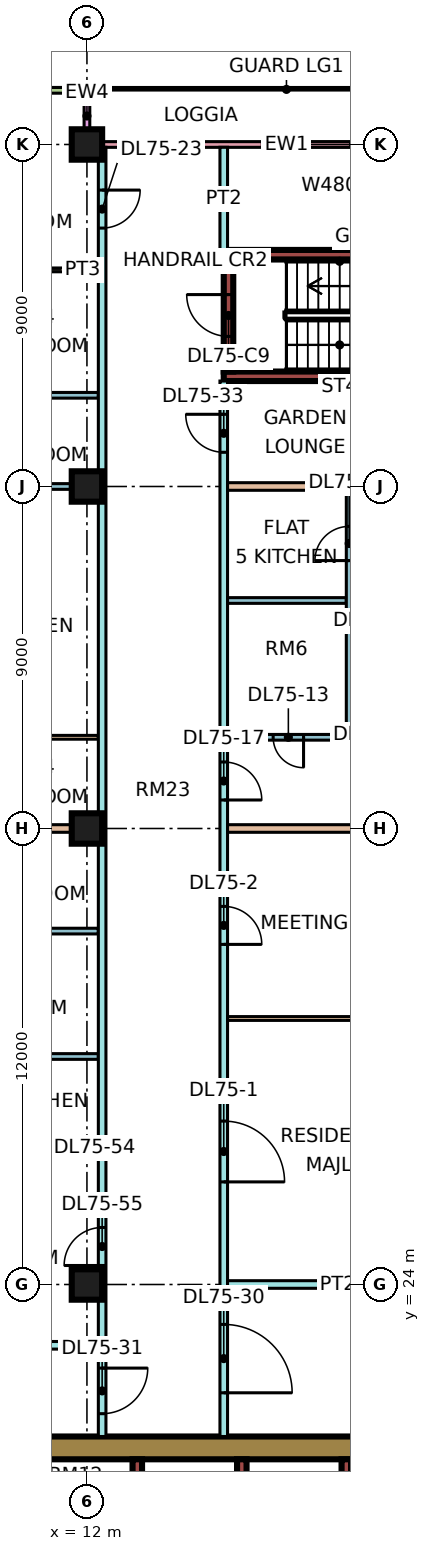
"""IFC4 building model, lengths in metres.
Left out: names, types, materials, properties, quantities, classifications, styles, units other than length and angle.
Written with IfcOpenShell. Run it as: python <this file> out.ifc"""

import sys

from ifc_helpers import new_model, si_unit, direction, frame, frame_2d, origin, origin_2d, place, context, subcontext, project, spatial, rectangle, extrude, element, fill, save


model = new_model("IFC4")
c1 = context("Model", 3, precision=1e-05, world=origin(), true_north=direction((0.0, 1.0)))
c2 = subcontext(c1, "Body", "Model", "MODEL_VIEW")
j1 = project(units=[si_unit("LENGTHUNIT", "METRE"), si_unit("PLANEANGLEUNIT", "RADIAN")], contexts=[c1])
p1 = place(None, origin())
s1 = spatial("IfcSite", under=j1, at=p1, CompositionType="ELEMENT")
p2 = place(p1, origin())
s2 = spatial("IfcBuilding", under=s1, at=p2, CompositionType="ELEMENT")
p3 = place(p2, frame((0.0, 0.0, 318.4)))
s3 = spatial("IfcBuildingStorey", under=s2, at=p3, CompositionType="ELEMENT", Elevation=318.4)
for number, where, z_axis, x_axis in (
    (1, (12.0, 24.0, 0.0), (0.0, 0.0, 1.0), (1.0, 0.0, 0.0)),
    (2, (12.0, 36.0, 0.0), (0.0, 0.0, 1.0), (1.0, 0.0, 0.0)),
    (3, (12.0, 45.0, 0.0), (0.0, 0.0, 1.0), (1.0, 0.0, 0.0)),
    (4, (12.0, 54.0, 0.0), (0.0, 0.0, 1.0), (1.0, 0.0, 0.0)),
):
    element("IfcColumn", number, at=place(p3, frame(where, z_axis=z_axis, x_axis=x_axis)), inside=s3, PredefinedType="COLUMN", context=c2, shape_type="SweptSolid", body=[
        extrude(rectangle(XDim=0.8, YDim=0.8, at=origin_2d()), origin(), (0.0, 0.0, 1.0), 3.75),
    ])
p4 = place(p3, frame((9.0, 19.7, 0.0), z_axis=(0.0, 0.0, 1.0), x_axis=(1.0, 0.0, 0.0)))
e5 = element("IfcWall", 5, at=p4, inside=s3, PredefinedType="SHEAR", context=c2, shape_type="SweptSolid", body=[
    extrude(rectangle(XDim=25.0, YDim=0.6, at=frame_2d((12.5, 0.0))), origin(), (0.0, 0.0, 1.0), 3.75),
])
p5 = place(p4, frame((19.1, 0.0, 0.0)))
e6 = element("IfcOpeningElement", 6, at=p5, cuts=e5, PredefinedType="OPENING", context=c2, shape_type="SweptSolid", body=[
    extrude(rectangle(XDim=1.8, YDim=2.4, at=frame_2d((0.9, 1.2))), frame((0.0, 0.31, 0.0), z_axis=(0.0, -1.0, 0.0), x_axis=(1.0, 0.0, 0.0)), (0.0, 0.0, 1.0), 0.62),
])
p6 = place(p3, frame((13.325, 7.6, 0.0), z_axis=(0.0, 0.0, 1.0), x_axis=(0.0, 1.0, 0.0)))
e7 = element("IfcWall", 7, at=p6, inside=s3, PredefinedType="SHEAR", context=c2, shape_type="SweptSolid", body=[
    extrude(rectangle(XDim=11.8, YDim=0.25, at=frame_2d((5.9, 0.0))), origin(), (0.0, 0.0, 1.0), 3.75),
])
for number, where, z_axis, x_axis in (
    (8, (16.075, 15.8, 0.0), (0.0, 0.0, 1.0), (0.0, 1.0, 0.0)),
    (9, (18.825, 15.8, 0.0), (0.0, 0.0, 1.0), (0.0, 1.0, 0.0)),
):
    element("IfcWall", number, at=place(p3, frame(where, z_axis=z_axis, x_axis=x_axis)), inside=s3, PredefinedType="SHEAR", context=c2, shape_type="SweptSolid", body=[
        extrude(rectangle(XDim=3.6, YDim=0.25, at=frame_2d((1.8, 0.0))), origin(), (0.0, 0.0, 1.0), 3.75),
    ])
for number, where, z_axis, x_axis in (
    (10, (15.6, 47.9, 0.0), (0.0, 0.0, 1.0), (1.0, 0.0, 0.0)),
    (11, (15.6, 51.1, 0.0), (0.0, 0.0, 1.0), (1.0, 0.0, 0.0)),
):
    element("IfcWall", number, at=place(p3, frame(where, z_axis=z_axis, x_axis=x_axis)), inside=s3, PredefinedType="SHEAR", context=c2, shape_type="SweptSolid", body=[
        extrude(rectangle(XDim=7.0, YDim=0.25, at=frame_2d((3.5, 0.0))), origin(), (0.0, 0.0, 1.0), 3.75),
    ])
p7 = place(p3, frame((15.725, 48.025, 0.0), z_axis=(0.0, 0.0, 1.0), x_axis=(0.0, 1.0, 0.0)))
e12 = element("IfcWall", 12, at=p7, inside=s3, PredefinedType="SHEAR", context=c2, shape_type="SweptSolid", body=[
    extrude(rectangle(XDim=2.95, YDim=0.25, at=frame_2d((1.475, 0.0))), origin(), (0.0, 0.0, 1.0), 3.75),
])
p8 = place(p7, frame((0.925, 0.0, 0.0)))
e13 = element("IfcOpeningElement", 13, at=p8, cuts=e12, PredefinedType="OPENING", context=c2, shape_type="SweptSolid", body=[
    extrude(rectangle(XDim=1.1, YDim=2.2, at=frame_2d((0.55, 1.1))), frame((0.0, 0.135, 0.0), z_axis=(0.0, -1.0, 0.0), x_axis=(1.0, 0.0, 0.0)), (0.0, 0.0, 1.0), 0.27),
])
p9 = place(p3, frame((22.425, 54.0, 0.0), z_axis=(0.0, 0.0, 1.0), x_axis=(-1.0, 0.0, 0.0)))
e14 = element("IfcWall", 14, at=p9, inside=s3, PredefinedType="SOLIDWALL", context=c2, shape_type="SweptSolid", body=[
    extrude(rectangle(XDim=10.35, YDim=0.15, at=frame_2d((5.175, 0.0))), origin(), (0.0, 0.0, 1.0), 3.3),
])
p10 = place(p9, frame((1.012, 0.0, 0.45)))
e15 = element("IfcOpeningElement", 15, at=p10, cuts=e14, PredefinedType="OPENING", context=c2, shape_type="SweptSolid", body=[
    extrude(rectangle(XDim=4.8, YDim=2.4, at=frame_2d((2.4, 1.2))), frame((0.0, 0.085, 0.0), z_axis=(0.0, -1.0, 0.0), x_axis=(1.0, 0.0, 0.0)), (0.0, 0.0, 1.0), 0.17),
])
p11 = place(p3, frame((12.0, 55.5, 0.0), z_axis=(0.0, 0.0, 1.0), x_axis=(0.0, -1.0, 0.0)))
e16 = element("IfcWall", 16, at=p11, inside=s3, PredefinedType="SOLIDWALL", context=c2, shape_type="SweptSolid", body=[
    extrude(rectangle(XDim=1.5, YDim=0.15, at=frame_2d((0.75, 0.0))), origin(), (0.0, 0.0, 1.0), 3.3),
])
p12 = place(p3, frame((11.925, 55.425, 0.0), z_axis=(0.0, 0.0, 1.0), x_axis=(-1.0, 0.0, 0.0)))
e17 = element("IfcWall", 17, at=p12, inside=s3, PredefinedType="SOLIDWALL", context=c2, shape_type="SweptSolid", body=[
    extrude(rectangle(XDim=10.425, YDim=0.15, at=frame_2d((5.212, 0.0))), origin(), (0.0, 0.0, 1.0), 3.3),
])
p13 = place(p12, frame((0.962, 0.0, 0.45)))
e18 = element("IfcOpeningElement", 18, at=p13, cuts=e17, PredefinedType="OPENING", context=c2, shape_type="SweptSolid", body=[
    extrude(rectangle(XDim=3.0, YDim=2.4, at=frame_2d((1.5, 1.2))), frame((0.0, 0.085, 0.0), z_axis=(0.0, -1.0, 0.0), x_axis=(1.0, 0.0, 0.0)), (0.0, 0.0, 1.0), 0.17),
])
p14 = place(p12, frame((6.175, 0.0, 0.45)))
e19 = element("IfcOpeningElement", 19, at=p14, cuts=e17, PredefinedType="OPENING", context=c2, shape_type="SweptSolid", body=[
    extrude(rectangle(XDim=3.0, YDim=2.4, at=frame_2d((1.5, 1.2))), frame((0.0, 0.085, 0.0), z_axis=(0.0, -1.0, 0.0), x_axis=(1.0, 0.0, 0.0)), (0.0, 0.0, 1.0), 0.17),
])
p15 = place(p3, frame((0.0, 36.0, 0.0), z_axis=(0.0, 0.0, 1.0), x_axis=(1.0, 0.0, 0.0)))
e20 = element("IfcWall", 20, at=p15, inside=s3, PredefinedType="PARTITIONING", context=c2, shape_type="SweptSolid", body=[
    extrude(rectangle(XDim=12.3, YDim=0.2, at=frame_2d((6.15, 0.0))), origin(), (0.0, 0.0, 1.0), 3.3),
])
p16 = place(p3, frame((0.074, 22.4, 0.0), z_axis=(0.0, 0.0, 1.0), x_axis=(1.0, 0.0, 0.0)))
e21 = element("IfcWall", 21, at=p16, inside=s3, PredefinedType="PARTITIONING", context=c2, shape_type="SweptSolid", body=[
    extrude(rectangle(XDim=12.226, YDim=0.2, at=frame_2d((6.113, 0.0))), origin(), (0.0, 0.0, 1.0), 3.3),
])
p17 = place(p3, frame((7.675, 27.6, 0.0), z_axis=(0.0, 0.0, 1.0), x_axis=(1.0, 0.0, 0.0)))
e22 = element("IfcWall", 22, at=p17, inside=s3, PredefinedType="PARTITIONING", context=c2, shape_type="SweptSolid", body=[
    extrude(rectangle(XDim=4.625, YDim=0.1, at=frame_2d((2.312, 0.0))), origin(), (0.0, 0.0, 1.0), 3.3),
])
p18 = place(p17, frame((1.875, 0.0, 0.0)))
e23 = element("IfcOpeningElement", 23, at=p18, cuts=e22, PredefinedType="OPENING", context=c2, shape_type="SweptSolid", body=[
    extrude(rectangle(XDim=0.9, YDim=2.1, at=frame_2d((0.45, 1.05))), frame((0.0, 0.06, 0.0), z_axis=(0.0, -1.0, 0.0), x_axis=(1.0, 0.0, 0.0)), (0.0, 0.0, 1.0), 0.12),
])
for number, where, z_axis, x_axis in (
    (24, (7.675, 30.0, 0.0), (0.0, 0.0, 1.0), (1.0, 0.0, 0.0)),
    (25, (7.675, 33.3, 0.0), (0.0, 0.0, 1.0), (1.0, 0.0, 0.0)),
):
    element("IfcWall", number, at=place(p3, frame(where, z_axis=z_axis, x_axis=x_axis)), inside=s3, PredefinedType="PARTITIONING", context=c2, shape_type="SweptSolid", body=[
        extrude(rectangle(XDim=4.625, YDim=0.15, at=frame_2d((2.312, 0.0))), origin(), (0.0, 0.0, 1.0), 3.3),
    ])
p19 = place(p3, frame((8.275, 38.4, 0.0), z_axis=(0.0, 0.0, 1.0), x_axis=(1.0, 0.0, 0.0)))
e26 = element("IfcWall", 26, at=p19, inside=s3, PredefinedType="PARTITIONING", context=c2, shape_type="SweptSolid", body=[
    extrude(rectangle(XDim=4.025, YDim=0.1, at=frame_2d((2.013, 0.0))), origin(), (0.0, 0.0, 1.0), 3.3),
])
for number, where, z_axis, x_axis in (
    (27, (8.275, 45.0, 0.0), (0.0, 0.0, 1.0), (1.0, 0.0, 0.0)),
    (28, (8.275, 47.4, 0.0), (0.0, 0.0, 1.0), (1.0, 0.0, 0.0)),
):
    element("IfcWall", number, at=place(p3, frame(where, z_axis=z_axis, x_axis=x_axis)), inside=s3, PredefinedType="PARTITIONING", context=c2, shape_type="SweptSolid", body=[
        extrude(rectangle(XDim=4.025, YDim=0.15, at=frame_2d((2.013, 0.0))), origin(), (0.0, 0.0, 1.0), 3.3),
    ])
p20 = place(p3, frame((8.275, 50.7, 0.0), z_axis=(0.0, 0.0, 1.0), x_axis=(1.0, 0.0, 0.0)))
e29 = element("IfcWall", 29, at=p20, inside=s3, PredefinedType="PARTITIONING", context=c2, shape_type="SweptSolid", body=[
    extrude(rectangle(XDim=4.025, YDim=0.1, at=frame_2d((2.013, 0.0))), origin(), (0.0, 0.0, 1.0), 3.3),
])
p21 = place(p20, frame((1.575, 0.0, 0.0)))
e30 = element("IfcOpeningElement", 30, at=p21, cuts=e29, PredefinedType="OPENING", context=c2, shape_type="SweptSolid", body=[
    extrude(rectangle(XDim=0.9, YDim=2.1, at=frame_2d((0.45, 1.05))), frame((0.0, 0.06, 0.0), z_axis=(0.0, -1.0, 0.0), x_axis=(1.0, 0.0, 0.0)), (0.0, 0.0, 1.0), 0.12),
])
p22 = place(p3, frame((12.4, 20.0, 0.0), z_axis=(0.0, 0.0, 1.0), x_axis=(0.0, 1.0, 0.0)))
e31 = element("IfcWall", 31, at=p22, inside=s3, PredefinedType="PARTITIONING", context=c2, shape_type="SweptSolid", body=[
    extrude(rectangle(XDim=33.926, YDim=0.2, at=frame_2d((16.963, 0.0))), origin(), (0.0, 0.0, 1.0), 3.3),
])
p23 = place(p22, frame((31.8, 0.0, 0.0)))
e32 = element("IfcOpeningElement", 32, at=p23, cuts=e31, PredefinedType="OPENING", context=c2, shape_type="SweptSolid", body=[
    extrude(rectangle(XDim=1.0, YDim=2.1, at=frame_2d((0.5, 1.05))), frame((0.0, 0.11, 0.0), z_axis=(0.0, -1.0, 0.0), x_axis=(1.0, 0.0, 0.0)), (0.0, 0.0, 1.0), 0.22),
])
p24 = place(p22, frame((0.6, 0.0, 0.0)))
e33 = element("IfcOpeningElement", 33, at=p24, cuts=e31, PredefinedType="OPENING", context=c2, shape_type="SweptSolid", body=[
    extrude(rectangle(XDim=1.2, YDim=2.1, at=frame_2d((0.6, 1.05))), frame((0.0, 0.11, 0.0), z_axis=(0.0, -1.0, 0.0), x_axis=(1.0, 0.0, 0.0)), (0.0, 0.0, 1.0), 0.22),
])
p25 = place(p22, frame((4.5, 0.0, 0.0)))
e34 = element("IfcOpeningElement", 34, at=p25, cuts=e31, PredefinedType="OPENING", context=c2, shape_type="SweptSolid", body=[
    extrude(rectangle(XDim=1.0, YDim=2.1, at=frame_2d((0.5, 1.05))), frame((0.0, 0.11, 0.0), z_axis=(0.0, -1.0, 0.0), x_axis=(1.0, 0.0, 0.0)), (0.0, 0.0, 1.0), 0.22),
])
p26 = place(p3, frame((15.6, 20.0, 0.0), z_axis=(0.0, 0.0, 1.0), x_axis=(0.0, 1.0, 0.0)))
e35 = element("IfcWall", 35, at=p26, inside=s3, PredefinedType="PARTITIONING", context=c2, shape_type="SweptSolid", body=[
    extrude(rectangle(XDim=27.775, YDim=0.2, at=frame_2d((13.887, 0.0))), origin(), (0.0, 0.0, 1.0), 3.3),
])
p27 = place(p26, frame((6.7, 0.0, 0.0)))
e36 = element("IfcOpeningElement", 36, at=p27, cuts=e35, PredefinedType="OPENING", context=c2, shape_type="SweptSolid", body=[
    extrude(rectangle(XDim=1.6, YDim=2.1, at=frame_2d((0.8, 1.05))), frame((0.0, 0.11, 0.0), z_axis=(0.0, -1.0, 0.0), x_axis=(1.0, 0.0, 0.0)), (0.0, 0.0, 1.0), 0.22),
])
p28 = place(p26, frame((12.95, 0.0, 0.0)))
e37 = element("IfcOpeningElement", 37, at=p28, cuts=e35, PredefinedType="OPENING", context=c2, shape_type="SweptSolid", body=[
    extrude(rectangle(XDim=1.0, YDim=2.1, at=frame_2d((0.5, 1.05))), frame((0.0, 0.11, 0.0), z_axis=(0.0, -1.0, 0.0), x_axis=(1.0, 0.0, 0.0)), (0.0, 0.0, 1.0), 0.22),
])
p29 = place(p26, frame((16.75, 0.0, 0.0)))
e38 = element("IfcOpeningElement", 38, at=p29, cuts=e35, PredefinedType="OPENING", context=c2, shape_type="SweptSolid", body=[
    extrude(rectangle(XDim=1.0, YDim=2.1, at=frame_2d((0.5, 1.05))), frame((0.0, 0.11, 0.0), z_axis=(0.0, -1.0, 0.0), x_axis=(1.0, 0.0, 0.0)), (0.0, 0.0, 1.0), 0.22),
])
p30 = place(p26, frame((1.15, 0.0, 0.0)))
e39 = element("IfcOpeningElement", 39, at=p30, cuts=e35, PredefinedType="OPENING", context=c2, shape_type="SweptSolid", body=[
    extrude(rectangle(XDim=1.8, YDim=2.1, at=frame_2d((0.9, 1.05))), frame((0.0, 0.11, 0.0), z_axis=(0.0, -1.0, 0.0), x_axis=(1.0, 0.0, 0.0)), (0.0, 0.0, 1.0), 0.22),
])
p31 = place(p26, frame((25.9, 0.0, 0.0)))
e40 = element("IfcOpeningElement", 40, at=p31, cuts=e35, PredefinedType="OPENING", context=c2, shape_type="SweptSolid", body=[
    extrude(rectangle(XDim=1.0, YDim=2.1, at=frame_2d((0.5, 1.05))), frame((0.0, 0.11, 0.0), z_axis=(0.0, -1.0, 0.0), x_axis=(1.0, 0.0, 0.0)), (0.0, 0.0, 1.0), 0.22),
])
p32 = place(p3, frame((15.6, 51.225, 0.0), z_axis=(0.0, 0.0, 1.0), x_axis=(0.0, 1.0, 0.0)))
e41 = element("IfcWall", 41, at=p32, inside=s3, PredefinedType="PARTITIONING", context=c2, shape_type="SweptSolid", body=[
    extrude(rectangle(XDim=2.701, YDim=0.2, at=frame_2d((1.351, 0.0))), origin(), (0.0, 0.0, 1.0), 3.3),
])
p33 = place(p3, frame((15.7, 24.0, 0.0), z_axis=(0.0, 0.0, 1.0), x_axis=(1.0, 0.0, 0.0)))
e42 = element("IfcWall", 42, at=p33, inside=s3, PredefinedType="PARTITIONING", context=c2, shape_type="SweptSolid", body=[
    extrude(rectangle(XDim=5.8, YDim=0.2, at=frame_2d((2.9, 0.0))), origin(), (0.0, 0.0, 1.0), 3.3),
])
p34 = place(p3, frame((15.7, 31.0, 0.0), z_axis=(0.0, 0.0, 1.0), x_axis=(1.0, 0.0, 0.0)))
e43 = element("IfcWall", 43, at=p34, inside=s3, PredefinedType="PARTITIONING", context=c2, shape_type="SweptSolid", body=[
    extrude(rectangle(XDim=5.8, YDim=0.1, at=frame_2d((2.9, 0.0))), origin(), (0.0, 0.0, 1.0), 3.3),
])
p35 = place(p3, frame((15.7, 36.0, 0.0), z_axis=(0.0, 0.0, 1.0), x_axis=(1.0, 0.0, 0.0)))
e44 = element("IfcWall", 44, at=p35, inside=s3, PredefinedType="PARTITIONING", context=c2, shape_type="SweptSolid", body=[
    extrude(rectangle(XDim=8.3, YDim=0.2, at=frame_2d((4.15, 0.0))), origin(), (0.0, 0.0, 1.0), 3.3),
])
p36 = place(p3, frame((15.7, 38.4, 0.0), z_axis=(0.0, 0.0, 1.0), x_axis=(1.0, 0.0, 0.0)))
e45 = element("IfcWall", 45, at=p36, inside=s3, PredefinedType="PARTITIONING", context=c2, shape_type="SweptSolid", body=[
    extrude(rectangle(XDim=3.125, YDim=0.15, at=frame_2d((1.562, 0.0))), origin(), (0.0, 0.0, 1.0), 3.3),
])
p37 = place(p36, frame((1.2, 0.0, 0.0)))
e46 = element("IfcOpeningElement", 46, at=p37, cuts=e45, PredefinedType="OPENING", context=c2, shape_type="SweptSolid", body=[
    extrude(rectangle(XDim=0.8, YDim=2.1, at=frame_2d((0.4, 1.05))), frame((0.0, 0.085, 0.0), z_axis=(0.0, -1.0, 0.0), x_axis=(1.0, 0.0, 0.0)), (0.0, 0.0, 1.0), 0.17),
])
p38 = place(p3, frame((15.7, 42.0, 0.0), z_axis=(0.0, 0.0, 1.0), x_axis=(1.0, 0.0, 0.0)))
e47 = element("IfcWall", 47, at=p38, inside=s3, PredefinedType="PARTITIONING", context=c2, shape_type="SweptSolid", body=[
    extrude(rectangle(XDim=3.125, YDim=0.15, at=frame_2d((1.562, 0.0))), origin(), (0.0, 0.0, 1.0), 3.3),
])
p39 = place(p3, frame((15.7, 45.0, 0.0), z_axis=(0.0, 0.0, 1.0), x_axis=(1.0, 0.0, 0.0)))
e48 = element("IfcWall", 48, at=p39, inside=s3, PredefinedType="PARTITIONING", context=c2, shape_type="SweptSolid", body=[
    extrude(rectangle(XDim=8.226, YDim=0.2, at=frame_2d((4.113, 0.0))), origin(), (0.0, 0.0, 1.0), 3.3),
])
p40 = place(p3, frame((18.9, 38.325, 0.0), z_axis=(0.0, 0.0, 1.0), x_axis=(0.0, 1.0, 0.0)))
e49 = element("IfcWall", 49, at=p40, inside=s3, PredefinedType="PARTITIONING", context=c2, shape_type="SweptSolid", body=[
    extrude(rectangle(XDim=6.575, YDim=0.15, at=frame_2d((3.288, 0.0))), origin(), (0.0, 0.0, 1.0), 3.3),
])
p41 = place(p40, frame((4.725, 0.0, 0.0)))
e50 = element("IfcOpeningElement", 50, at=p41, cuts=e49, PredefinedType="OPENING", context=c2, shape_type="SweptSolid", body=[
    extrude(rectangle(XDim=0.9, YDim=2.1, at=frame_2d((0.45, 1.05))), frame((0.0, 0.085, 0.0), z_axis=(0.0, -1.0, 0.0), x_axis=(1.0, 0.0, 0.0)), (0.0, 0.0, 1.0), 0.17),
])
p42 = place(p10, origin())
e51 = element("IfcWindow", 51, at=p42, inside=s3, PartitioningType="SINGLE_PANEL", PredefinedType="WINDOW", context=c2, shape_type="SweptSolid", body=[
    extrude(rectangle(XDim=4.8, YDim=2.4, at=frame_2d((2.4, 1.2))), frame((0.0, 0.03, 0.0), z_axis=(0.0, -1.0, 0.0), x_axis=(1.0, 0.0, 0.0)), (0.0, 0.0, 1.0), 0.06),
])
fill(e15, e51)
p43 = place(p8, frame((1.1, 0.0, 0.0), z_axis=(0.0, 0.0, 1.0), x_axis=(-1.0, 0.0, 0.0)))
e52 = element("IfcDoor", 52, at=p43, inside=s3, OperationType="SINGLE_SWING_RIGHT", PredefinedType="DOOR", context=c2, shape_type="SweptSolid", body=[
    extrude(rectangle(XDim=1.1, YDim=2.2, at=frame_2d((0.55, 1.1))), frame((0.0, 0.025, 0.0), z_axis=(0.0, -1.0, 0.0), x_axis=(1.0, 0.0, 0.0)), (0.0, 0.0, 1.0), 0.05),
])
fill(e13, e52)
p44 = place(p27, frame((1.6, 0.0, 0.0), z_axis=(0.0, 0.0, 1.0), x_axis=(-1.0, 0.0, 0.0)))
e53 = element("IfcDoor", 53, at=p44, inside=s3, OperationType="DOUBLE_DOOR_SINGLE_SWING", PredefinedType="DOOR", context=c2, shape_type="SweptSolid", body=[
    extrude(rectangle(XDim=1.6, YDim=2.1, at=frame_2d((0.8, 1.05))), frame((0.0, 0.025, 0.0), z_axis=(0.0, -1.0, 0.0), x_axis=(1.0, 0.0, 0.0)), (0.0, 0.0, 1.0), 0.05),
])
fill(e36, e53)
p45 = place(p28, frame((1.0, 0.0, 0.0), z_axis=(0.0, 0.0, 1.0), x_axis=(-1.0, 0.0, 0.0)))
e54 = element("IfcDoor", 54, at=p45, inside=s3, OperationType="SINGLE_SWING_LEFT", PredefinedType="DOOR", context=c2, shape_type="SweptSolid", body=[
    extrude(rectangle(XDim=1.0, YDim=2.1, at=frame_2d((0.5, 1.05))), frame((0.0, 0.025, 0.0), z_axis=(0.0, -1.0, 0.0), x_axis=(1.0, 0.0, 0.0)), (0.0, 0.0, 1.0), 0.05),
])
fill(e37, e54)
p46 = place(p37, origin())
e55 = element("IfcDoor", 55, at=p46, inside=s3, OperationType="SINGLE_SWING_RIGHT", PredefinedType="DOOR", context=c2, shape_type="SweptSolid", body=[
    extrude(rectangle(XDim=0.8, YDim=2.1, at=frame_2d((0.4, 1.05))), frame((0.0, 0.025, 0.0), z_axis=(0.0, -1.0, 0.0), x_axis=(1.0, 0.0, 0.0)), (0.0, 0.0, 1.0), 0.05),
])
fill(e46, e55)
p47 = place(p41, origin())
e56 = element("IfcDoor", 56, at=p47, inside=s3, OperationType="SINGLE_SWING_LEFT", PredefinedType="DOOR", context=c2, shape_type="SweptSolid", body=[
    extrude(rectangle(XDim=0.9, YDim=2.1, at=frame_2d((0.45, 1.05))), frame((0.0, 0.025, 0.0), z_axis=(0.0, -1.0, 0.0), x_axis=(1.0, 0.0, 0.0)), (0.0, 0.0, 1.0), 0.05),
])
fill(e50, e56)
p48 = place(p29, frame((1.0, 0.0, 0.0), z_axis=(0.0, 0.0, 1.0), x_axis=(-1.0, 0.0, 0.0)))
e57 = element("IfcDoor", 57, at=p48, inside=s3, OperationType="SINGLE_SWING_LEFT", PredefinedType="DOOR", context=c2, shape_type="SweptSolid", body=[
    extrude(rectangle(XDim=1.0, YDim=2.1, at=frame_2d((0.5, 1.05))), frame((0.0, 0.025, 0.0), z_axis=(0.0, -1.0, 0.0), x_axis=(1.0, 0.0, 0.0)), (0.0, 0.0, 1.0), 0.05),
])
fill(e38, e57)
p49 = place(p23, origin())
e58 = element("IfcDoor", 58, at=p49, inside=s3, OperationType="SINGLE_SWING_RIGHT", PredefinedType="DOOR", context=c2, shape_type="SweptSolid", body=[
    extrude(rectangle(XDim=1.0, YDim=2.1, at=frame_2d((0.5, 1.05))), frame((0.0, 0.025, 0.0), z_axis=(0.0, -1.0, 0.0), x_axis=(1.0, 0.0, 0.0)), (0.0, 0.0, 1.0), 0.05),
])
fill(e32, e58)
p50 = place(p30, frame((1.8, 0.0, 0.0), z_axis=(0.0, 0.0, 1.0), x_axis=(-1.0, 0.0, 0.0)))
e59 = element("IfcDoor", 59, at=p50, inside=s3, OperationType="DOUBLE_DOOR_SINGLE_SWING", PredefinedType="DOOR", context=c2, shape_type="SweptSolid", body=[
    extrude(rectangle(XDim=1.8, YDim=2.1, at=frame_2d((0.9, 1.05))), frame((0.0, 0.025, 0.0), z_axis=(0.0, -1.0, 0.0), x_axis=(1.0, 0.0, 0.0)), (0.0, 0.0, 1.0), 0.05),
])
fill(e39, e59)
p51 = place(p24, origin())
e60 = element("IfcDoor", 60, at=p51, inside=s3, OperationType="SINGLE_SWING_RIGHT", PredefinedType="DOOR", context=c2, shape_type="SweptSolid", body=[
    extrude(rectangle(XDim=1.2, YDim=2.1, at=frame_2d((0.6, 1.05))), frame((0.0, 0.025, 0.0), z_axis=(0.0, -1.0, 0.0), x_axis=(1.0, 0.0, 0.0)), (0.0, 0.0, 1.0), 0.05),
])
fill(e33, e60)
p52 = place(p31, frame((1.0, 0.0, 0.0), z_axis=(0.0, 0.0, 1.0), x_axis=(-1.0, 0.0, 0.0)))
e61 = element("IfcDoor", 61, at=p52, inside=s3, OperationType="SINGLE_SWING_RIGHT", PredefinedType="DOOR", context=c2, shape_type="SweptSolid", body=[
    extrude(rectangle(XDim=1.0, YDim=2.1, at=frame_2d((0.5, 1.05))), frame((0.0, 0.025, 0.0), z_axis=(0.0, -1.0, 0.0), x_axis=(1.0, 0.0, 0.0)), (0.0, 0.0, 1.0), 0.05),
])
fill(e40, e61)
p53 = place(p25, origin())
e62 = element("IfcDoor", 62, at=p53, inside=s3, OperationType="SINGLE_SWING_LEFT", PredefinedType="DOOR", context=c2, shape_type="SweptSolid", body=[
    extrude(rectangle(XDim=1.0, YDim=2.1, at=frame_2d((0.5, 1.05))), frame((0.0, 0.025, 0.0), z_axis=(0.0, -1.0, 0.0), x_axis=(1.0, 0.0, 0.0)), (0.0, 0.0, 1.0), 0.05),
])
fill(e34, e62)
save(model, sys.argv[1])
